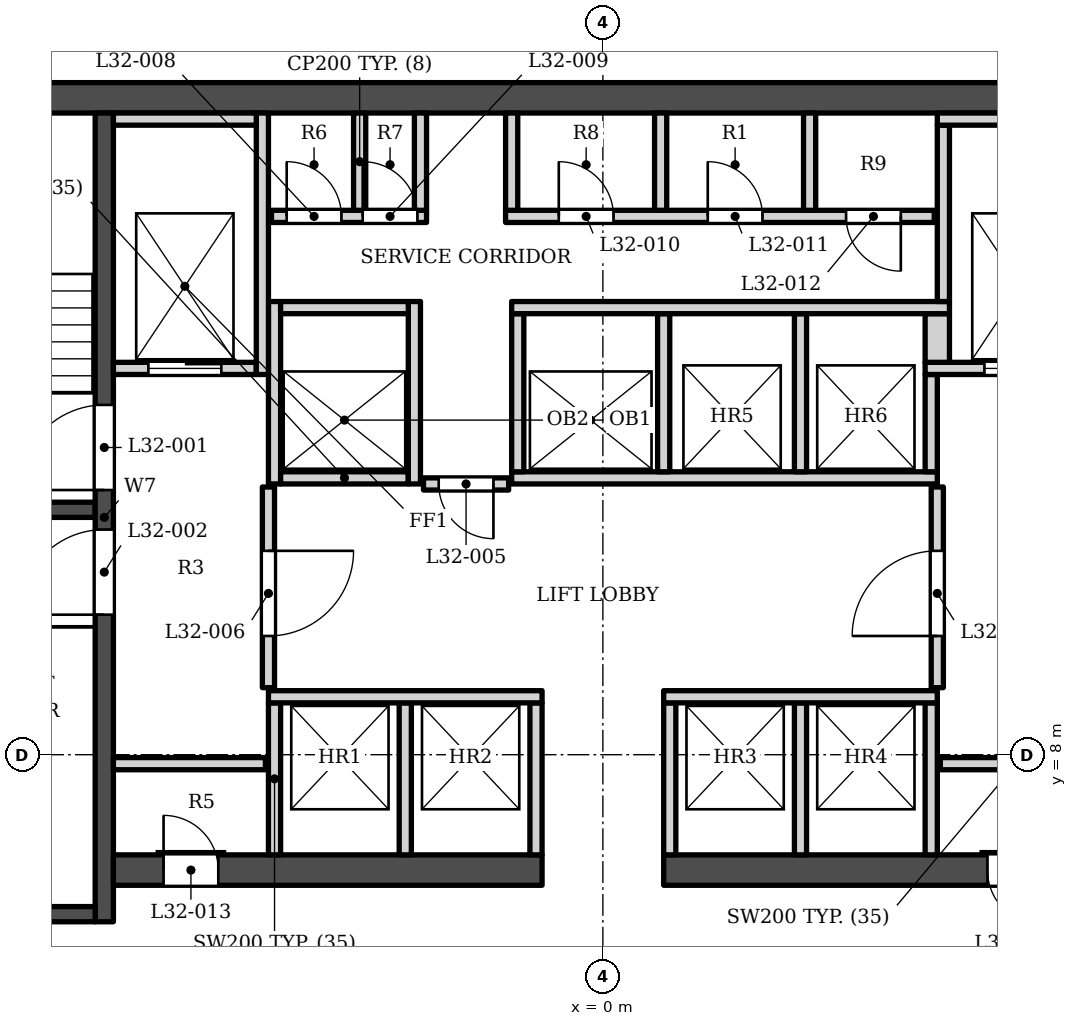
"""IFC4 building model, lengths in metres.
Left out: names, types, materials, properties, quantities, classifications, styles, units other than length and angle.
Written with IfcOpenShell. Run it as: python <this file> out.ifc"""

import sys

from ifc_helpers import new_model, si_unit, direction, frame, frame_2d, origin, place, context, subcontext, project, spatial, rectangle, extrude, element, fill, save


model = new_model("IFC4")
c1 = context("Model", 3, precision=1e-05, world=origin(), true_north=direction((0.0, 1.0)))
c2 = subcontext(c1, "Body", "Model", "MODEL_VIEW")
j1 = project(units=[si_unit("LENGTHUNIT", "METRE"), si_unit("PLANEANGLEUNIT", "RADIAN")], contexts=[c1])
p1 = place(None, origin())
s1 = spatial("IfcSite", under=j1, at=p1, CompositionType="ELEMENT")
p2 = place(p1, origin())
s2 = spatial("IfcBuilding", under=s1, at=p2, CompositionType="ELEMENT")
p3 = place(p2, frame((0.0, 0.0, 139.6)))
s3 = spatial("IfcBuildingStorey", under=s2, at=p3, CompositionType="ELEMENT", Elevation=139.6)
p4 = place(p3, frame((-16.9, 18.802, 0.0), z_axis=(0.0, 0.0, 1.0), x_axis=(1.0, 0.0, 0.0)))
e1 = element("IfcWall", 1, at=p4, inside=s3, PredefinedType="SHEAR", context=c2, shape_type="SweptSolid", body=[
    extrude(rectangle(XDim=33.8, YDim=0.5, at=frame_2d((16.9, 0.0))), origin(), (0.0, 0.0, 1.0), 5.0),
])
p5 = place(p3, frame((-8.2, 5.253, 0.0), z_axis=(0.0, 0.0, 1.0), x_axis=(0.0, 1.0, 0.0)))
e2 = element("IfcWall", 2, at=p5, inside=s3, PredefinedType="SHEAR", context=c2, shape_type="SweptSolid", body=[
    extrude(rectangle(XDim=13.3, YDim=0.3, at=frame_2d((6.65, 0.0))), origin(), (0.0, 0.0, 1.0), 5.0),
])
p6 = place(p5, frame((7.1, 0.0, 0.0)))
e3 = element("IfcOpeningElement", 3, at=p6, cuts=e2, PredefinedType="OPENING", context=c2, shape_type="SweptSolid", body=[
    extrude(rectangle(XDim=1.4, YDim=2.1, at=frame_2d((0.7, 1.05))), frame((0.0, 0.16, 0.0), z_axis=(0.0, -1.0, 0.0), x_axis=(1.0, 0.0, 0.0)), (0.0, 0.0, 1.0), 0.32),
])
p7 = place(p5, frame((5.05, 0.0, 0.0)))
e4 = element("IfcOpeningElement", 4, at=p7, cuts=e2, PredefinedType="OPENING", context=c2, shape_type="SweptSolid", body=[
    extrude(rectangle(XDim=1.4, YDim=2.1, at=frame_2d((0.7, 1.05))), frame((0.0, 0.16, 0.0), z_axis=(0.0, -1.0, 0.0), x_axis=(1.0, 0.0, 0.0)), (0.0, 0.0, 1.0), 0.32),
])
for number, where, z_axis, x_axis in (
    (5, (-12.1, 12.028, 0.0), (0.0, 0.0, 1.0), (1.0, 0.0, 0.0)),
    (6, (-12.1, 5.378, 0.0), (0.0, 0.0, 1.0), (1.0, 0.0, 0.0)),
):
    element("IfcWall", number, at=place(p3, frame(where, z_axis=z_axis, x_axis=x_axis)), inside=s3, PredefinedType="SHEAR", context=c2, shape_type="SweptSolid", body=[
        extrude(rectangle(XDim=3.75, YDim=0.25, at=frame_2d((1.875, 0.0))), origin(), (0.0, 0.0, 1.0), 5.0),
    ])
p8 = place(p3, frame((-8.05, 6.103, 0.0), z_axis=(0.0, 0.0, 1.0), x_axis=(1.0, 0.0, 0.0)))
e7 = element("IfcWall", 7, at=p8, inside=s3, PredefinedType="SHEAR", context=c2, shape_type="SweptSolid", body=[
    extrude(rectangle(XDim=7.05, YDim=0.5, at=frame_2d((3.525, 0.0))), origin(), (0.0, 0.0, 1.0), 5.0),
])
p9 = place(p8, frame((0.825, 0.0, 0.0)))
e8 = element("IfcOpeningElement", 8, at=p9, cuts=e7, PredefinedType="OPENING", context=c2, shape_type="SweptSolid", body=[
    extrude(rectangle(XDim=0.9, YDim=2.1, at=frame_2d((0.45, 1.05))), frame((0.0, 0.26, 0.0), z_axis=(0.0, -1.0, 0.0), x_axis=(1.0, 0.0, 0.0)), (0.0, 0.0, 1.0), 0.52),
])
p10 = place(p3, frame((1.0, 6.103, 0.0), z_axis=(0.0, 0.0, 1.0), x_axis=(1.0, 0.0, 0.0)))
e9 = element("IfcWall", 9, at=p10, inside=s3, PredefinedType="SHEAR", context=c2, shape_type="SweptSolid", body=[
    extrude(rectangle(XDim=7.05, YDim=0.5, at=frame_2d((3.525, 0.0))), origin(), (0.0, 0.0, 1.0), 5.0),
])
p11 = place(p10, frame((5.325, 0.0, 0.0)))
e10 = element("IfcOpeningElement", 10, at=p11, cuts=e9, PredefinedType="OPENING", context=c2, shape_type="SweptSolid", body=[
    extrude(rectangle(XDim=0.9, YDim=2.1, at=frame_2d((0.45, 1.05))), frame((0.0, 0.26, 0.0), z_axis=(0.0, -1.0, 0.0), x_axis=(1.0, 0.0, 0.0)), (0.0, 0.0, 1.0), 0.52),
])
for number, where, z_axis, x_axis in (
    (11, (-5.4, 6.353, 0.0), (0.0, 0.0, 1.0), (0.0, 1.0, 0.0)),
    (12, (-3.25, 6.353, 0.0), (0.0, 0.0, 1.0), (0.0, 1.0, 0.0)),
    (13, (-1.1, 6.353, 0.0), (0.0, 0.0, 1.0), (0.0, 1.0, 0.0)),
    (14, (1.1, 6.353, 0.0), (0.0, 0.0, 1.0), (0.0, 1.0, 0.0)),
    (15, (3.25, 6.353, 0.0), (0.0, 0.0, 1.0), (0.0, 1.0, 0.0)),
    (16, (5.4, 6.353, 0.0), (0.0, 0.0, 1.0), (0.0, 1.0, 0.0)),
    (17, (-8.05, 7.853, 0.0), (0.0, 0.0, 1.0), (1.0, 0.0, 0.0)),
    (18, (5.55, 7.853, 0.0), (0.0, 0.0, 1.0), (1.0, 0.0, 0.0)),
):
    element("IfcWall", number, at=place(p3, frame(where, z_axis=z_axis, x_axis=x_axis)), inside=s3, PredefinedType="SOLIDWALL", context=c2, shape_type="SweptSolid", body=[
        extrude(rectangle(XDim=2.5, YDim=0.2, at=frame_2d((1.25, 0.0))), origin(), (0.0, 0.0, 1.0), 4.83),
    ])
for number, where, z_axis, x_axis in (
    (19, (-5.5, 8.953, 0.0), (0.0, 0.0, 1.0), (1.0, 0.0, 0.0)),
    (20, (1.0, 8.953, 0.0), (0.0, 0.0, 1.0), (1.0, 0.0, 0.0)),
):
    element("IfcWall", number, at=place(p3, frame(where, z_axis=z_axis, x_axis=x_axis)), inside=s3, PredefinedType="SOLIDWALL", context=c2, shape_type="SweptSolid", body=[
        extrude(rectangle(XDim=4.5, YDim=0.2, at=frame_2d((2.25, 0.0))), origin(), (0.0, 0.0, 1.0), 4.83),
    ])
p12 = place(p3, frame((-5.5, 9.103, 0.0), z_axis=(0.0, 0.0, 1.0), x_axis=(0.0, 1.0, 0.0)))
e21 = element("IfcWall", 21, at=p12, inside=s3, PredefinedType="SOLIDWALL", context=c2, shape_type="SweptSolid", body=[
    extrude(rectangle(XDim=3.3, YDim=0.2, at=frame_2d((1.65, 0.0))), origin(), (0.0, 0.0, 1.0), 4.83),
])
p13 = place(p12, frame((0.85, 0.0, 0.0)))
e22 = element("IfcOpeningElement", 22, at=p13, cuts=e21, PredefinedType="OPENING", context=c2, shape_type="SweptSolid", body=[
    extrude(rectangle(XDim=1.4, YDim=2.1, at=frame_2d((0.7, 1.05))), frame((0.0, 0.11, 0.0), z_axis=(0.0, -1.0, 0.0), x_axis=(1.0, 0.0, 0.0)), (0.0, 0.0, 1.0), 0.22),
])
p14 = place(p3, frame((5.5, 9.103, 0.0), z_axis=(0.0, 0.0, 1.0), x_axis=(0.0, 1.0, 0.0)))
e23 = element("IfcWall", 23, at=p14, inside=s3, PredefinedType="SOLIDWALL", context=c2, shape_type="SweptSolid", body=[
    extrude(rectangle(XDim=3.3, YDim=0.2, at=frame_2d((1.65, 0.0))), origin(), (0.0, 0.0, 1.0), 4.83),
])
p15 = place(p14, frame((0.85, 0.0, 0.0)))
e24 = element("IfcOpeningElement", 24, at=p15, cuts=e23, PredefinedType="OPENING", context=c2, shape_type="SweptSolid", body=[
    extrude(rectangle(XDim=1.4, YDim=2.1, at=frame_2d((0.7, 1.05))), frame((0.0, 0.11, 0.0), z_axis=(0.0, -1.0, 0.0), x_axis=(1.0, 0.0, 0.0)), (0.0, 0.0, 1.0), 0.22),
])
p16 = place(p3, frame((-2.95, 12.453, 0.0), z_axis=(0.0, 0.0, 1.0), x_axis=(1.0, 0.0, 0.0)))
e25 = element("IfcWall", 25, at=p16, inside=s3, PredefinedType="SOLIDWALL", context=c2, shape_type="SweptSolid", body=[
    extrude(rectangle(XDim=1.4, YDim=0.2, at=frame_2d((0.7, 0.0))), origin(), (0.0, 0.0, 1.0), 4.83),
])
p17 = place(p16, frame((0.25, 0.0, 0.0)))
e26 = element("IfcOpeningElement", 26, at=p17, cuts=e25, PredefinedType="OPENING", context=c2, shape_type="SweptSolid", body=[
    extrude(rectangle(XDim=0.9, YDim=2.1, at=frame_2d((0.45, 1.05))), frame((0.0, 0.11, 0.0), z_axis=(0.0, -1.0, 0.0), x_axis=(1.0, 0.0, 0.0)), (0.0, 0.0, 1.0), 0.22),
])
p18 = place(p3, frame((-5.4, 12.453, 0.0), z_axis=(0.0, 0.0, 1.0), x_axis=(0.0, 1.0, 0.0)))
e27 = element("IfcWall", 27, at=p18, inside=s3, PredefinedType="SOLIDWALL", context=c2, shape_type="SweptSolid", body=[
    extrude(rectangle(XDim=3.0, YDim=0.2, at=frame_2d((1.5, 0.0))), origin(), (0.0, 0.0, 1.0), 4.83),
])
p19 = place(p3, frame((-5.3, 12.552, 0.0), z_axis=(0.0, 0.0, 1.0), x_axis=(1.0, 0.0, 0.0)))
e28 = element("IfcWall", 28, at=p19, inside=s3, PredefinedType="SOLIDWALL", context=c2, shape_type="SweptSolid", body=[
    extrude(rectangle(XDim=2.1, YDim=0.2, at=frame_2d((1.05, 0.0))), origin(), (0.0, 0.0, 1.0), 4.83),
])
p20 = place(p3, frame((-3.1, 12.453, 0.0), z_axis=(0.0, 0.0, 1.0), x_axis=(0.0, 1.0, 0.0)))
e29 = element("IfcWall", 29, at=p20, inside=s3, PredefinedType="SOLIDWALL", context=c2, shape_type="SweptSolid", body=[
    extrude(rectangle(XDim=3.0, YDim=0.2, at=frame_2d((1.5, 0.0))), origin(), (0.0, 0.0, 1.0), 4.83),
])
p21 = place(p3, frame((-1.5, 12.552, 0.0), z_axis=(0.0, 0.0, 1.0), x_axis=(1.0, 0.0, 0.0)))
e30 = element("IfcWall", 30, at=p21, inside=s3, PredefinedType="SOLIDWALL", context=c2, shape_type="SweptSolid", body=[
    extrude(rectangle(XDim=7.0, YDim=0.2, at=frame_2d((3.5, 0.0))), origin(), (0.0, 0.0, 1.0), 4.83),
])
for number, where, z_axis, x_axis in (
    (31, (-1.4, 12.653, 0.0), (0.0, 0.0, 1.0), (0.0, 1.0, 0.0)),
    (32, (1.0, 12.653, 0.0), (0.0, 0.0, 1.0), (0.0, 1.0, 0.0)),
    (33, (3.25, 12.653, 0.0), (0.0, 0.0, 1.0), (0.0, 1.0, 0.0)),
):
    element("IfcWall", number, at=place(p3, frame(where, z_axis=z_axis, x_axis=x_axis)), inside=s3, PredefinedType="SOLIDWALL", context=c2, shape_type="SweptSolid", body=[
        extrude(rectangle(XDim=2.6, YDim=0.2, at=frame_2d((1.3, 0.0))), origin(), (0.0, 0.0, 1.0), 4.83),
    ])
p22 = place(p3, frame((5.4, 12.653, 0.0), z_axis=(0.0, 0.0, 1.0), x_axis=(0.0, 1.0, 0.0)))
e34 = element("IfcWall", 34, at=p22, inside=s3, PredefinedType="SOLIDWALL", context=c2, shape_type="SweptSolid", body=[
    extrude(rectangle(XDim=1.6, YDim=0.2, at=frame_2d((0.8, 0.0))), origin(), (0.0, 0.0, 1.0), 4.83),
])
p23 = place(p3, frame((-8.05, 14.353, 0.0), z_axis=(0.0, 0.0, 1.0), x_axis=(1.0, 0.0, 0.0)))
e35 = element("IfcWall", 35, at=p23, inside=s3, PredefinedType="SOLIDWALL", context=c2, shape_type="SweptSolid", body=[
    extrude(rectangle(XDim=2.35, YDim=0.2, at=frame_2d((1.175, 0.0))), origin(), (0.0, 0.0, 1.0), 4.83),
])
p24 = place(p23, frame((0.575, 0.0, 0.0)))
e36 = element("IfcOpeningElement", 36, at=p24, cuts=e35, PredefinedType="OPENING", context=c2, shape_type="SweptSolid", body=[
    extrude(rectangle(XDim=1.2, YDim=2.1, at=frame_2d((0.6, 1.05))), frame((0.0, 0.11, 0.0), z_axis=(0.0, -1.0, 0.0), x_axis=(1.0, 0.0, 0.0)), (0.0, 0.0, 1.0), 0.22),
])
p25 = place(p3, frame((-5.6, 14.253, 0.0), z_axis=(0.0, 0.0, 1.0), x_axis=(0.0, 1.0, 0.0)))
e37 = element("IfcWall", 37, at=p25, inside=s3, PredefinedType="SOLIDWALL", context=c2, shape_type="SweptSolid", body=[
    extrude(rectangle(XDim=4.3, YDim=0.2, at=frame_2d((2.15, 0.0))), origin(), (0.0, 0.0, 1.0), 4.83),
])
p26 = place(p3, frame((5.3, 14.353, 0.0), z_axis=(0.0, 0.0, 1.0), x_axis=(1.0, 0.0, 0.0)))
e38 = element("IfcWall", 38, at=p26, inside=s3, PredefinedType="SOLIDWALL", context=c2, shape_type="SweptSolid", body=[
    extrude(rectangle(XDim=2.75, YDim=0.2, at=frame_2d((1.375, 0.0))), origin(), (0.0, 0.0, 1.0), 4.83),
])
p27 = place(p26, frame((0.975, 0.0, 0.0)))
e39 = element("IfcOpeningElement", 39, at=p27, cuts=e38, PredefinedType="OPENING", context=c2, shape_type="SweptSolid", body=[
    extrude(rectangle(XDim=1.2, YDim=2.1, at=frame_2d((0.6, 1.05))), frame((0.0, 0.11, 0.0), z_axis=(0.0, -1.0, 0.0), x_axis=(1.0, 0.0, 0.0)), (0.0, 0.0, 1.0), 0.22),
])
p28 = place(p3, frame((5.5, 14.453, 0.0), z_axis=(0.0, 0.0, 1.0), x_axis=(0.0, 1.0, 0.0)))
e40 = element("IfcWall", 40, at=p28, inside=s3, PredefinedType="SOLIDWALL", context=c2, shape_type="SweptSolid", body=[
    extrude(rectangle(XDim=0.8, YDim=0.4, at=frame_2d((0.4, 0.0))), origin(), (0.0, 0.0, 1.0), 4.83),
])
p29 = place(p3, frame((-5.3, 15.353, 0.0), z_axis=(0.0, 0.0, 1.0), x_axis=(1.0, 0.0, 0.0)))
e41 = element("IfcWall", 41, at=p29, inside=s3, PredefinedType="SOLIDWALL", context=c2, shape_type="SweptSolid", body=[
    extrude(rectangle(XDim=2.1, YDim=0.2, at=frame_2d((1.05, 0.0))), origin(), (0.0, 0.0, 1.0), 4.83),
])
p30 = place(p3, frame((-1.5, 15.353, 0.0), z_axis=(0.0, 0.0, 1.0), x_axis=(1.0, 0.0, 0.0)))
e42 = element("IfcWall", 42, at=p30, inside=s3, PredefinedType="SOLIDWALL", context=c2, shape_type="SweptSolid", body=[
    extrude(rectangle(XDim=7.2, YDim=0.2, at=frame_2d((3.6, 0.0))), origin(), (0.0, 0.0, 1.0), 4.83),
])
p31 = place(p3, frame((5.6, 15.453, 0.0), z_axis=(0.0, 0.0, 1.0), x_axis=(0.0, 1.0, 0.0)))
e43 = element("IfcWall", 43, at=p31, inside=s3, PredefinedType="SOLIDWALL", context=c2, shape_type="SweptSolid", body=[
    extrude(rectangle(XDim=2.9, YDim=0.2, at=frame_2d((1.45, 0.0))), origin(), (0.0, 0.0, 1.0), 4.83),
])
p32 = place(p3, frame((-5.45, 16.853, 0.0), z_axis=(0.0, 0.0, 1.0), x_axis=(1.0, 0.0, 0.0)))
e44 = element("IfcWall", 44, at=p32, inside=s3, PredefinedType="SOLIDWALL", context=c2, shape_type="SweptSolid", body=[
    extrude(rectangle(XDim=2.55, YDim=0.2, at=frame_2d((1.275, 0.0))), origin(), (0.0, 0.0, 1.0), 4.83),
])
p33 = place(p32, frame((0.25, 0.0, 0.0)))
e45 = element("IfcOpeningElement", 45, at=p33, cuts=e44, PredefinedType="OPENING", context=c2, shape_type="SweptSolid", body=[
    extrude(rectangle(XDim=0.9, YDim=2.1, at=frame_2d((0.45, 1.05))), frame((0.0, 0.11, 0.0), z_axis=(0.0, -1.0, 0.0), x_axis=(1.0, 0.0, 0.0)), (0.0, 0.0, 1.0), 0.22),
])
p34 = place(p32, frame((1.5, 0.0, 0.0)))
e46 = element("IfcOpeningElement", 46, at=p34, cuts=e44, PredefinedType="OPENING", context=c2, shape_type="SweptSolid", body=[
    extrude(rectangle(XDim=0.9, YDim=2.1, at=frame_2d((0.45, 1.05))), frame((0.0, 0.11, 0.0), z_axis=(0.0, -1.0, 0.0), x_axis=(1.0, 0.0, 0.0)), (0.0, 0.0, 1.0), 0.22),
])
p35 = place(p3, frame((-1.6, 16.853, 0.0), z_axis=(0.0, 0.0, 1.0), x_axis=(1.0, 0.0, 0.0)))
e47 = element("IfcWall", 47, at=p35, inside=s3, PredefinedType="SOLIDWALL", context=c2, shape_type="SweptSolid", body=[
    extrude(rectangle(XDim=7.05, YDim=0.2, at=frame_2d((3.525, 0.0))), origin(), (0.0, 0.0, 1.0), 4.83),
])
p36 = place(p35, frame((0.875, 0.0, 0.0)))
e48 = element("IfcOpeningElement", 48, at=p36, cuts=e47, PredefinedType="OPENING", context=c2, shape_type="SweptSolid", body=[
    extrude(rectangle(XDim=0.9, YDim=2.1, at=frame_2d((0.45, 1.05))), frame((0.0, 0.11, 0.0), z_axis=(0.0, -1.0, 0.0), x_axis=(1.0, 0.0, 0.0)), (0.0, 0.0, 1.0), 0.22),
])
p37 = place(p35, frame((3.325, 0.0, 0.0)))
e49 = element("IfcOpeningElement", 49, at=p37, cuts=e47, PredefinedType="OPENING", context=c2, shape_type="SweptSolid", body=[
    extrude(rectangle(XDim=0.9, YDim=2.1, at=frame_2d((0.45, 1.05))), frame((0.0, 0.11, 0.0), z_axis=(0.0, -1.0, 0.0), x_axis=(1.0, 0.0, 0.0)), (0.0, 0.0, 1.0), 0.22),
])
p38 = place(p35, frame((5.6, 0.0, 0.0)))
e50 = element("IfcOpeningElement", 50, at=p38, cuts=e47, PredefinedType="OPENING", context=c2, shape_type="SweptSolid", body=[
    extrude(rectangle(XDim=0.9, YDim=2.1, at=frame_2d((0.45, 1.05))), frame((0.0, 0.11, 0.0), z_axis=(0.0, -1.0, 0.0), x_axis=(1.0, 0.0, 0.0)), (0.0, 0.0, 1.0), 0.22),
])
for number, where, z_axis, x_axis in (
    (51, (-4.0, 16.953, 0.0), (0.0, 0.0, 1.0), (0.0, 1.0, 0.0)),
    (52, (-3.0, 16.953, 0.0), (0.0, 0.0, 1.0), (0.0, 1.0, 0.0)),
    (53, (-1.5, 16.953, 0.0), (0.0, 0.0, 1.0), (0.0, 1.0, 0.0)),
    (54, (0.95, 16.953, 0.0), (0.0, 0.0, 1.0), (0.0, 1.0, 0.0)),
    (55, (3.4, 16.953, 0.0), (0.0, 0.0, 1.0), (0.0, 1.0, 0.0)),
):
    element("IfcWall", number, at=place(p3, frame(where, z_axis=z_axis, x_axis=x_axis)), inside=s3, PredefinedType="PARTITIONING", context=c2, shape_type="SweptSolid", body=[
        extrude(rectangle(XDim=1.6, YDim=0.2, at=frame_2d((0.8, 0.0))), origin(), (0.0, 0.0, 1.0), 4.83),
    ])
p39 = place(p3, frame((-8.05, 18.453, 0.0), z_axis=(0.0, 0.0, 1.0), x_axis=(1.0, 0.0, 0.0)))
e56 = element("IfcWall", 56, at=p39, inside=s3, PredefinedType="SOLIDWALL", context=c2, shape_type="SweptSolid", body=[
    extrude(rectangle(XDim=2.35, YDim=0.2, at=frame_2d((1.175, 0.0))), origin(), (0.0, 0.0, 1.0), 4.83),
])
p40 = place(p3, frame((5.5, 18.453, 0.0), z_axis=(0.0, 0.0, 1.0), x_axis=(1.0, 0.0, 0.0)))
e57 = element("IfcWall", 57, at=p40, inside=s3, PredefinedType="SOLIDWALL", context=c2, shape_type="SweptSolid", body=[
    extrude(rectangle(XDim=2.55, YDim=0.2, at=frame_2d((1.275, 0.0))), origin(), (0.0, 0.0, 1.0), 4.83),
])
p41 = place(p24, origin())
e58 = element("IfcDoor", 58, at=p41, inside=s3, OperationType="DOUBLE_DOOR_SLIDING", PredefinedType="DOOR", context=c2, shape_type="SweptSolid", body=[
    extrude(rectangle(XDim=1.2, YDim=2.1, at=frame_2d((0.6, 1.05))), frame((0.0, 0.025, 0.0), z_axis=(0.0, -1.0, 0.0), x_axis=(1.0, 0.0, 0.0)), (0.0, 0.0, 1.0), 0.05),
])
fill(e36, e58)
p42 = place(p27, origin())
e59 = element("IfcDoor", 59, at=p42, inside=s3, OperationType="DOUBLE_DOOR_SLIDING", PredefinedType="DOOR", context=c2, shape_type="SweptSolid", body=[
    extrude(rectangle(XDim=1.2, YDim=2.1, at=frame_2d((0.6, 1.05))), frame((0.0, 0.025, 0.0), z_axis=(0.0, -1.0, 0.0), x_axis=(1.0, 0.0, 0.0)), (0.0, 0.0, 1.0), 0.05),
])
fill(e39, e59)
p43 = place(p6, origin())
e60 = element("IfcDoor", 60, at=p43, inside=s3, OperationType="SINGLE_SWING_LEFT", PredefinedType="DOOR", context=c2, shape_type="SweptSolid", body=[
    extrude(rectangle(XDim=1.4, YDim=2.1, at=frame_2d((0.7, 1.05))), frame((0.0, 0.025, 0.0), z_axis=(0.0, -1.0, 0.0), x_axis=(1.0, 0.0, 0.0)), (0.0, 0.0, 1.0), 0.05),
])
fill(e3, e60)
p44 = place(p7, origin())
e61 = element("IfcDoor", 61, at=p44, inside=s3, OperationType="SINGLE_SWING_LEFT", PredefinedType="DOOR", context=c2, shape_type="SweptSolid", body=[
    extrude(rectangle(XDim=1.4, YDim=2.1, at=frame_2d((0.7, 1.05))), frame((0.0, 0.025, 0.0), z_axis=(0.0, -1.0, 0.0), x_axis=(1.0, 0.0, 0.0)), (0.0, 0.0, 1.0), 0.05),
])
fill(e4, e61)
p45 = place(p17, origin())
e62 = element("IfcDoor", 62, at=p45, inside=s3, OperationType="SINGLE_SWING_RIGHT", PredefinedType="DOOR", context=c2, shape_type="SweptSolid", body=[
    extrude(rectangle(XDim=0.9, YDim=2.1, at=frame_2d((0.45, 1.05))), frame((0.0, 0.025, 0.0), z_axis=(0.0, -1.0, 0.0), x_axis=(1.0, 0.0, 0.0)), (0.0, 0.0, 1.0), 0.05),
])
fill(e26, e62)
p46 = place(p13, origin())
e63 = element("IfcDoor", 63, at=p46, inside=s3, OperationType="SINGLE_SWING_RIGHT", PredefinedType="DOOR", context=c2, shape_type="SweptSolid", body=[
    extrude(rectangle(XDim=1.4, YDim=2.1, at=frame_2d((0.7, 1.05))), frame((0.0, 0.025, 0.0), z_axis=(0.0, -1.0, 0.0), x_axis=(1.0, 0.0, 0.0)), (0.0, 0.0, 1.0), 0.05),
])
fill(e22, e63)
p47 = place(p15, origin())
e64 = element("IfcDoor", 64, at=p47, inside=s3, OperationType="SINGLE_SWING_LEFT", PredefinedType="DOOR", context=c2, shape_type="SweptSolid", body=[
    extrude(rectangle(XDim=1.4, YDim=2.1, at=frame_2d((0.7, 1.05))), frame((0.0, 0.025, 0.0), z_axis=(0.0, -1.0, 0.0), x_axis=(1.0, 0.0, 0.0)), (0.0, 0.0, 1.0), 0.05),
])
fill(e24, e64)
p48 = place(p33, origin())
e65 = element("IfcDoor", 65, at=p48, inside=s3, OperationType="SINGLE_SWING_LEFT", PredefinedType="DOOR", context=c2, shape_type="SweptSolid", body=[
    extrude(rectangle(XDim=0.9, YDim=2.1, at=frame_2d((0.45, 1.05))), frame((0.0, 0.025, 0.0), z_axis=(0.0, -1.0, 0.0), x_axis=(1.0, 0.0, 0.0)), (0.0, 0.0, 1.0), 0.05),
])
fill(e45, e65)
p49 = place(p34, origin())
e66 = element("IfcDoor", 66, at=p49, inside=s3, OperationType="SINGLE_SWING_LEFT", PredefinedType="DOOR", context=c2, shape_type="SweptSolid", body=[
    extrude(rectangle(XDim=0.9, YDim=2.1, at=frame_2d((0.45, 1.05))), frame((0.0, 0.025, 0.0), z_axis=(0.0, -1.0, 0.0), x_axis=(1.0, 0.0, 0.0)), (0.0, 0.0, 1.0), 0.05),
])
fill(e46, e66)
p50 = place(p36, origin())
e67 = element("IfcDoor", 67, at=p50, inside=s3, OperationType="SINGLE_SWING_LEFT", PredefinedType="DOOR", context=c2, shape_type="SweptSolid", body=[
    extrude(rectangle(XDim=0.9, YDim=2.1, at=frame_2d((0.45, 1.05))), frame((0.0, 0.025, 0.0), z_axis=(0.0, -1.0, 0.0), x_axis=(1.0, 0.0, 0.0)), (0.0, 0.0, 1.0), 0.05),
])
fill(e48, e67)
p51 = place(p37, origin())
e68 = element("IfcDoor", 68, at=p51, inside=s3, OperationType="SINGLE_SWING_LEFT", PredefinedType="DOOR", context=c2, shape_type="SweptSolid", body=[
    extrude(rectangle(XDim=0.9, YDim=2.1, at=frame_2d((0.45, 1.05))), frame((0.0, 0.025, 0.0), z_axis=(0.0, -1.0, 0.0), x_axis=(1.0, 0.0, 0.0)), (0.0, 0.0, 1.0), 0.05),
])
fill(e49, e68)
p52 = place(p38, origin())
e69 = element("IfcDoor", 69, at=p52, inside=s3, OperationType="SINGLE_SWING_RIGHT", PredefinedType="DOOR", context=c2, shape_type="SweptSolid", body=[
    extrude(rectangle(XDim=0.9, YDim=2.1, at=frame_2d((0.45, 1.05))), frame((0.0, 0.025, 0.0), z_axis=(0.0, -1.0, 0.0), x_axis=(1.0, 0.0, 0.0)), (0.0, 0.0, 1.0), 0.05),
])
fill(e50, e69)
p53 = place(p9, origin())
e70 = element("IfcDoor", 70, at=p53, inside=s3, OperationType="SINGLE_SWING_LEFT", PredefinedType="DOOR", context=c2, shape_type="SweptSolid", body=[
    extrude(rectangle(XDim=0.9, YDim=2.1, at=frame_2d((0.45, 1.05))), frame((0.0, 0.025, 0.0), z_axis=(0.0, -1.0, 0.0), x_axis=(1.0, 0.0, 0.0)), (0.0, 0.0, 1.0), 0.05),
])
fill(e8, e70)
p54 = place(p11, origin())
e71 = element("IfcDoor", 71, at=p54, inside=s3, OperationType="SINGLE_SWING_RIGHT", PredefinedType="DOOR", context=c2, shape_type="SweptSolid", body=[
    extrude(rectangle(XDim=0.9, YDim=2.1, at=frame_2d((0.45, 1.05))), frame((0.0, 0.025, 0.0), z_axis=(0.0, -1.0, 0.0), x_axis=(1.0, 0.0, 0.0)), (0.0, 0.0, 1.0), 0.05),
])
fill(e10, e71)
save(model, sys.argv[1])
